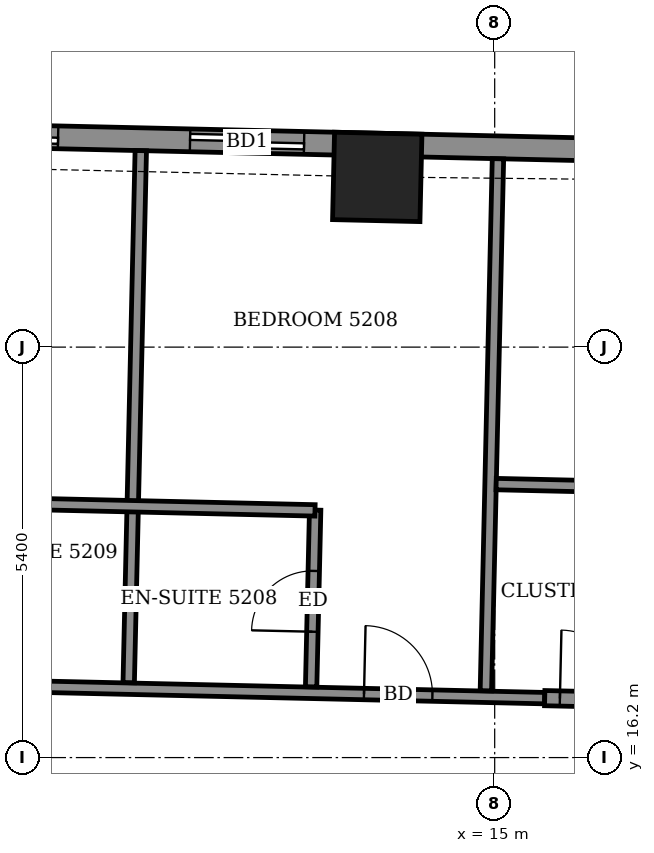
"""IFC4 building model, lengths in metres.
Left out: names, types, materials, properties, quantities, classifications, styles, units other than length and angle.
Written with IfcOpenShell. Run it as: python <this file> out.ifc"""

import sys

from ifc_helpers import new_model, si_unit, direction, frame, frame_2d, origin, origin_2d, place, context, subcontext, project, spatial, rectangle, extrude, element, fill, save


model = new_model("IFC4")
c1 = context("Model", 3, precision=1e-05, world=origin(), true_north=direction((0.0, 1.0)))
c2 = subcontext(c1, "Body", "Model", "MODEL_VIEW")
j1 = project(units=[si_unit("LENGTHUNIT", "METRE"), si_unit("PLANEANGLEUNIT", "RADIAN")], contexts=[c1])
p1 = place(None, origin())
s1 = spatial("IfcSite", under=j1, at=p1, CompositionType="ELEMENT")
p2 = place(p1, origin())
s2 = spatial("IfcBuilding", under=s1, at=p2, CompositionType="ELEMENT")
p3 = place(p2, frame((0.0, 0.0, 205.1)))
s3 = spatial("IfcBuildingStorey", under=s2, at=p3, CompositionType="ELEMENT", Elevation=205.1)
p4 = place(p3, frame((13.455, 23.839, -0.55), z_axis=(0.0, 0.0, 1.0), x_axis=(-0.999741400599, 0.022740534932, 0.0)))
e1 = element("IfcColumn", 1, at=p4, inside=s3, PredefinedType="COLUMN", context=c2, shape_type="SweptSolid", body=[
    extrude(rectangle(XDim=1.15, YDim=1.15, at=origin_2d()), origin(), (0.0, 0.0, 1.0), 3.6),
])
p5 = place(p3, frame((20.437, 24.106, 0.0), z_axis=(0.0, 0.0, 1.0), x_axis=(-0.999742506232, 0.022691875925, 0.0)))
e2 = element("IfcWall", 2, at=p5, inside=s3, PredefinedType="SOLIDWALL", context=c2, shape_type="SweptSolid", body=[
    extrude(rectangle(XDim=42.444, YDim=0.3, at=frame_2d((21.222, 0.0))), origin(), (0.0, 0.0, 1.0), 3.05),
])
p6 = place(p5, frame((2.287, 0.0, 0.0)))
e3 = element("IfcOpeningElement", 3, at=p6, cuts=e2, PredefinedType="OPENING", context=c2, shape_type="SweptSolid", body=[
    extrude(rectangle(XDim=1.5, YDim=2.4, at=frame_2d((0.75, 1.2))), frame((0.0, 0.16, 0.0), z_axis=(0.0, -1.0, 0.0), x_axis=(1.0, 0.0, 0.0)), (0.0, 0.0, 1.0), 0.32),
])
p7 = place(p5, frame((7.947, 0.0, 0.0)))
e4 = element("IfcOpeningElement", 4, at=p7, cuts=e2, PredefinedType="OPENING", context=c2, shape_type="SweptSolid", body=[
    extrude(rectangle(XDim=1.5, YDim=2.4, at=frame_2d((0.75, 1.2))), frame((0.0, 0.16, 0.0), z_axis=(0.0, -1.0, 0.0), x_axis=(1.0, 0.0, 0.0)), (0.0, 0.0, 1.0), 0.32),
])
p8 = place(p5, frame((11.184, 0.0, 0.0)))
e5 = element("IfcOpeningElement", 5, at=p8, cuts=e2, PredefinedType="OPENING", context=c2, shape_type="SweptSolid", body=[
    extrude(rectangle(XDim=1.5, YDim=2.4, at=frame_2d((0.75, 1.2))), frame((0.0, 0.16, 0.0), z_axis=(0.0, -1.0, 0.0), x_axis=(1.0, 0.0, 0.0)), (0.0, 0.0, 1.0), 0.32),
])
p9 = place(p5, frame((16.469, 0.0, 0.0)))
e6 = element("IfcOpeningElement", 6, at=p9, cuts=e2, PredefinedType="OPENING", context=c2, shape_type="SweptSolid", body=[
    extrude(rectangle(XDim=1.5, YDim=2.4, at=frame_2d((0.75, 1.2))), frame((0.0, 0.16, 0.0), z_axis=(0.0, -1.0, 0.0), x_axis=(1.0, 0.0, 0.0)), (0.0, 0.0, 1.0), 0.32),
])
p10 = place(p5, frame((22.02, 0.0, 0.0)))
e7 = element("IfcOpeningElement", 7, at=p10, cuts=e2, PredefinedType="OPENING", context=c2, shape_type="SweptSolid", body=[
    extrude(rectangle(XDim=1.5, YDim=2.4, at=frame_2d((0.75, 1.2))), frame((0.0, 0.16, 0.0), z_axis=(0.0, -1.0, 0.0), x_axis=(1.0, 0.0, 0.0)), (0.0, 0.0, 1.0), 0.32),
])
p11 = place(p5, frame((25.257, 0.0, 0.0)))
e8 = element("IfcOpeningElement", 8, at=p11, cuts=e2, PredefinedType="OPENING", context=c2, shape_type="SweptSolid", body=[
    extrude(rectangle(XDim=1.5, YDim=2.4, at=frame_2d((0.75, 1.2))), frame((0.0, 0.16, 0.0), z_axis=(0.0, -1.0, 0.0), x_axis=(1.0, 0.0, 0.0)), (0.0, 0.0, 1.0), 0.32),
])
p12 = place(p5, frame((30.057, 0.0, 0.0)))
e9 = element("IfcOpeningElement", 9, at=p12, cuts=e2, PredefinedType="OPENING", context=c2, shape_type="SweptSolid", body=[
    extrude(rectangle(XDim=1.5, YDim=2.4, at=frame_2d((0.75, 1.2))), frame((0.0, 0.16, 0.0), z_axis=(0.0, -1.0, 0.0), x_axis=(1.0, 0.0, 0.0)), (0.0, 0.0, 1.0), 0.32),
])
p13 = place(p5, frame((33.294, 0.0, 0.0)))
e10 = element("IfcOpeningElement", 10, at=p13, cuts=e2, PredefinedType="OPENING", context=c2, shape_type="SweptSolid", body=[
    extrude(rectangle(XDim=1.5, YDim=2.4, at=frame_2d((0.75, 1.2))), frame((0.0, 0.16, 0.0), z_axis=(0.0, -1.0, 0.0), x_axis=(1.0, 0.0, 0.0)), (0.0, 0.0, 1.0), 0.32),
])
p14 = place(p5, frame((38.484, 0.0, 0.9)))
e11 = element("IfcOpeningElement", 11, at=p14, cuts=e2, PredefinedType="OPENING", context=c2, shape_type="SweptSolid", body=[
    extrude(rectangle(XDim=2.4, YDim=1.5, at=frame_2d((1.2, 0.75))), frame((0.0, 0.16, 0.0), z_axis=(0.0, -1.0, 0.0), x_axis=(1.0, 0.0, 0.0)), (0.0, 0.0, 1.0), 0.32),
])
p15 = place(p3, frame((-14.871, 17.675, 0.0), z_axis=(0.0, 0.0, 1.0), x_axis=(0.999742359486, -0.02269834024, 0.0)))
e12 = element("IfcWall", 12, at=p15, inside=s3, PredefinedType="PARTITIONING", context=c2, shape_type="SweptSolid", body=[
    extrude(rectangle(XDim=30.536, YDim=0.15, at=frame_2d((15.268, 0.0))), origin(), (0.0, 0.0, 1.0), 3.05),
])
p16 = place(p15, frame((28.159, 0.0, 0.0)))
e13 = element("IfcOpeningElement", 13, at=p16, cuts=e12, PredefinedType="OPENING", context=c2, shape_type="SweptSolid", body=[
    extrude(rectangle(XDim=0.9, YDim=2.1, at=frame_2d((0.45, 1.05))), frame((0.0, 0.085, 0.0), z_axis=(0.0, -1.0, 0.0), x_axis=(1.0, 0.0, 0.0)), (0.0, 0.0, 1.0), 0.17),
])
p17 = place(p15, frame((21.034, 0.0, 0.0)))
e14 = element("IfcOpeningElement", 14, at=p17, cuts=e12, PredefinedType="OPENING", context=c2, shape_type="SweptSolid", body=[
    extrude(rectangle(XDim=0.9, YDim=2.1, at=frame_2d((0.45, 1.05))), frame((0.0, 0.085, 0.0), z_axis=(0.0, -1.0, 0.0), x_axis=(1.0, 0.0, 0.0)), (0.0, 0.0, 1.0), 0.17),
])
p18 = place(p15, frame((18.684, 0.0, 0.0)))
e15 = element("IfcOpeningElement", 15, at=p18, cuts=e12, PredefinedType="OPENING", context=c2, shape_type="SweptSolid", body=[
    extrude(rectangle(XDim=0.9, YDim=2.1, at=frame_2d((0.45, 1.05))), frame((0.0, 0.085, 0.0), z_axis=(0.0, -1.0, 0.0), x_axis=(1.0, 0.0, 0.0)), (0.0, 0.0, 1.0), 0.17),
])
p19 = place(p15, frame((11.709, 0.0, 0.0)))
e16 = element("IfcOpeningElement", 16, at=p19, cuts=e12, PredefinedType="OPENING", context=c2, shape_type="SweptSolid", body=[
    extrude(rectangle(XDim=0.9, YDim=2.1, at=frame_2d((0.45, 1.05))), frame((0.0, 0.085, 0.0), z_axis=(0.0, -1.0, 0.0), x_axis=(1.0, 0.0, 0.0)), (0.0, 0.0, 1.0), 0.17),
])
p20 = place(p15, frame((9.734, 0.0, 0.0)))
e17 = element("IfcOpeningElement", 17, at=p20, cuts=e12, PredefinedType="OPENING", context=c2, shape_type="SweptSolid", body=[
    extrude(rectangle(XDim=0.9, YDim=2.1, at=frame_2d((0.45, 1.05))), frame((0.0, 0.085, 0.0), z_axis=(0.0, -1.0, 0.0), x_axis=(1.0, 0.0, 0.0)), (0.0, 0.0, 1.0), 0.17),
])
p21 = place(p15, frame((2.859, 0.0, 0.0)))
e18 = element("IfcOpeningElement", 18, at=p21, cuts=e12, PredefinedType="OPENING", context=c2, shape_type="SweptSolid", body=[
    extrude(rectangle(XDim=0.9, YDim=2.1, at=frame_2d((0.45, 1.05))), frame((0.0, 0.085, 0.0), z_axis=(0.0, -1.0, 0.0), x_axis=(1.0, 0.0, 0.0)), (0.0, 0.0, 1.0), 0.17),
])
p22 = place(p15, frame((0.584, 0.0, 0.0)))
e19 = element("IfcOpeningElement", 19, at=p22, cuts=e12, PredefinedType="OPENING", context=c2, shape_type="SweptSolid", body=[
    extrude(rectangle(XDim=0.9, YDim=2.1, at=frame_2d((0.45, 1.05))), frame((0.0, 0.085, 0.0), z_axis=(0.0, -1.0, 0.0), x_axis=(1.0, 0.0, 0.0)), (0.0, 0.0, 1.0), 0.17),
])
p23 = place(p3, frame((15.658, 16.982, 0.0), z_axis=(0.0, 0.0, 1.0), x_axis=(0.99974485859, -0.022587999516, 0.0)))
e20 = element("IfcWall", 20, at=p23, inside=s3, PredefinedType="PARTITIONING", context=c2, shape_type="SweptSolid", body=[
    extrude(rectangle(XDim=7.566, YDim=0.2, at=frame_2d((3.783, 0.0))), origin(), (0.0, 0.0, 1.0), 3.05),
])
p24 = place(p23, frame((4.794, 0.0, 0.0)))
e21 = element("IfcOpeningElement", 21, at=p24, cuts=e20, PredefinedType="OPENING", context=c2, shape_type="SweptSolid", body=[
    extrude(rectangle(XDim=1.0, YDim=2.1, at=frame_2d((0.5, 1.05))), frame((0.0, 0.11, 0.0), z_axis=(0.0, -1.0, 0.0), x_axis=(1.0, 0.0, 0.0)), (0.0, 0.0, 1.0), 0.22),
])
p25 = place(p23, frame((0.2, 0.0, 0.0)))
e22 = element("IfcOpeningElement", 22, at=p25, cuts=e20, PredefinedType="OPENING", context=c2, shape_type="SweptSolid", body=[
    extrude(rectangle(XDim=0.9, YDim=2.1, at=frame_2d((0.45, 1.05))), frame((0.0, 0.11, 0.0), z_axis=(0.0, -1.0, 0.0), x_axis=(1.0, 0.0, 0.0)), (0.0, 0.0, 1.0), 0.22),
])
p26 = place(p3, frame((10.185, 17.186, 0.0), z_axis=(0.0, 0.0, 1.0), x_axis=(0.022702393474, 0.999742267452, 0.0)))
e23 = element("IfcWall", 23, at=p26, inside=s3, PredefinedType="PARTITIONING", context=c2, shape_type="SweptSolid", body=[
    extrude(rectangle(XDim=7.001, YDim=0.15, at=frame_2d((3.5, 0.0))), origin(), (0.0, 0.0, 1.0), 2.55),
])
p27 = place(p3, frame((12.585, 17.131, 0.0), z_axis=(0.0, 0.0, 1.0), x_axis=(0.022781023197, 0.999740478815, 0.0)))
e24 = element("IfcWall", 24, at=p27, inside=s3, PredefinedType="PARTITIONING", context=c2, shape_type="SweptSolid", body=[
    extrude(rectangle(XDim=2.325, YDim=0.15, at=frame_2d((1.163, 0.0))), origin(), (0.0, 0.0, 1.0), 3.05),
])
p28 = place(p27, frame((0.725, 0.0, 0.0)))
e25 = element("IfcOpeningElement", 25, at=p28, cuts=e24, PredefinedType="OPENING", context=c2, shape_type="SweptSolid", body=[
    extrude(rectangle(XDim=0.8, YDim=2.1, at=frame_2d((0.4, 1.05))), frame((0.0, 0.085, 0.0), z_axis=(0.0, -1.0, 0.0), x_axis=(1.0, 0.0, 0.0)), (0.0, 0.0, 1.0), 0.17),
])
p29 = place(p3, frame((14.884, 17.079, 0.0), z_axis=(0.0, 0.0, 1.0), x_axis=(0.022703185001, 0.999742249478, 0.0)))
e26 = element("IfcWall", 26, at=p29, inside=s3, PredefinedType="PARTITIONING", context=c2, shape_type="SweptSolid", body=[
    extrude(rectangle(XDim=7.0, YDim=0.15, at=frame_2d((3.5, 0.0))), origin(), (0.0, 0.0, 1.0), 2.55),
])
p30 = place(p3, frame((7.837, 19.561, 0.0), z_axis=(0.0, 0.0, 1.0), x_axis=(0.99974154664, -0.022734113616, 0.0)))
e27 = element("IfcWall", 27, at=p30, inside=s3, PredefinedType="PARTITIONING", context=c2, shape_type="SweptSolid", body=[
    extrude(rectangle(XDim=4.8, YDim=0.15, at=frame_2d((2.4, 0.0))), origin(), (0.0, 0.0, 1.0), 3.05),
])
p31 = place(p3, frame((15.019, 19.798, 0.0), z_axis=(0.0, 0.0, 1.0), x_axis=(0.999740260747, -0.02279059109, 0.0)))
e28 = element("IfcWall", 28, at=p31, inside=s3, PredefinedType="PARTITIONING", context=c2, shape_type="SweptSolid", body=[
    extrude(rectangle(XDim=2.324, YDim=0.15, at=frame_2d((1.162, 0.0))), origin(), (0.0, 0.0, 1.0), 3.05),
])
p32 = place(p7, origin())
e29 = element("IfcDoor", 29, at=p32, inside=s3, OperationType="SLIDING_TO_LEFT", PredefinedType="DOOR", context=c2, shape_type="SweptSolid", body=[
    extrude(rectangle(XDim=1.5, YDim=2.4, at=frame_2d((0.75, 1.2))), frame((0.0, 0.025, 0.0), z_axis=(0.0, -1.0, 0.0), x_axis=(1.0, 0.0, 0.0)), (0.0, 0.0, 1.0), 0.05),
])
fill(e4, e29)
p33 = place(p8, origin())
e30 = element("IfcDoor", 30, at=p33, inside=s3, OperationType="SLIDING_TO_LEFT", PredefinedType="DOOR", context=c2, shape_type="SweptSolid", body=[
    extrude(rectangle(XDim=1.5, YDim=2.4, at=frame_2d((0.75, 1.2))), frame((0.0, 0.025, 0.0), z_axis=(0.0, -1.0, 0.0), x_axis=(1.0, 0.0, 0.0)), (0.0, 0.0, 1.0), 0.05),
])
fill(e5, e30)
p34 = place(p25, origin())
e31 = element("IfcDoor", 31, at=p34, inside=s3, OperationType="SINGLE_SWING_LEFT", PredefinedType="DOOR", context=c2, shape_type="SweptSolid", body=[
    extrude(rectangle(XDim=0.9, YDim=2.1, at=frame_2d((0.45, 1.05))), frame((0.0, 0.025, 0.0), z_axis=(0.0, -1.0, 0.0), x_axis=(1.0, 0.0, 0.0)), (0.0, 0.0, 1.0), 0.05),
])
fill(e22, e31)
p35 = place(p16, origin())
e32 = element("IfcDoor", 32, at=p35, inside=s3, OperationType="SINGLE_SWING_RIGHT", PredefinedType="DOOR", context=c2, shape_type="SweptSolid", body=[
    extrude(rectangle(XDim=0.9, YDim=2.1, at=frame_2d((0.45, 1.05))), frame((0.0, 0.025, 0.0), z_axis=(0.0, -1.0, 0.0), x_axis=(1.0, 0.0, 0.0)), (0.0, 0.0, 1.0), 0.05),
])
fill(e13, e32)
p36 = place(p28, origin())
e33 = element("IfcDoor", 33, at=p36, inside=s3, OperationType="SINGLE_SWING_RIGHT", PredefinedType="DOOR", context=c2, shape_type="SweptSolid", body=[
    extrude(rectangle(XDim=0.8, YDim=2.1, at=frame_2d((0.4, 1.05))), frame((0.0, 0.025, 0.0), z_axis=(0.0, -1.0, 0.0), x_axis=(1.0, 0.0, 0.0)), (0.0, 0.0, 1.0), 0.05),
])
fill(e25, e33)
save(model, sys.argv[1])
